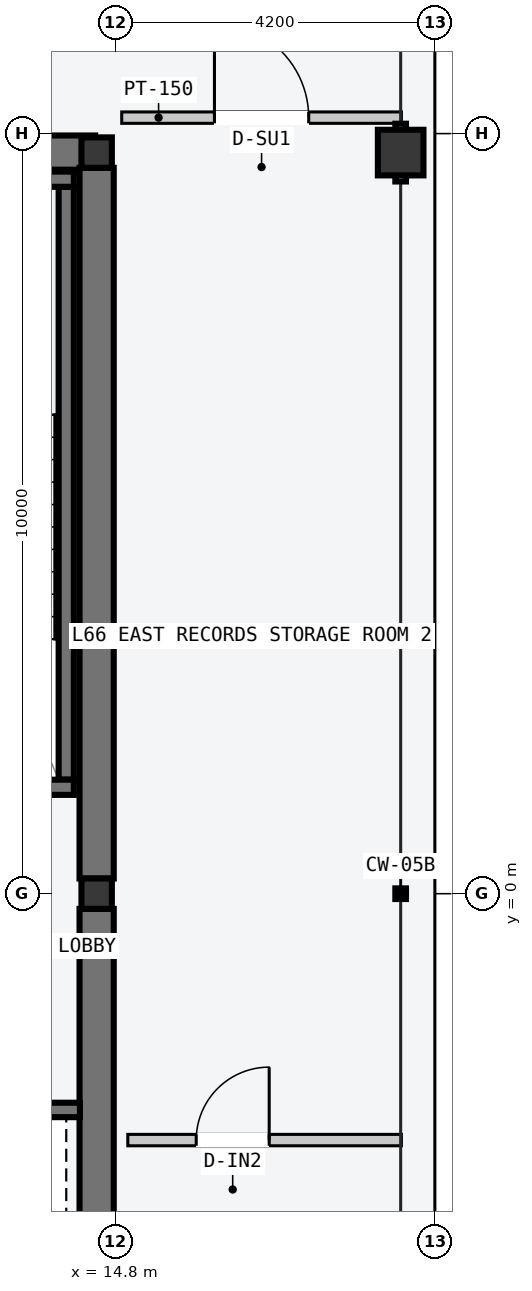
"""IFC4 building model, lengths in metres.
Left out: names, types, materials, properties, quantities, classifications, styles, units other than length and angle.
Written with IfcOpenShell. Run it as: python <this file> out.ifc"""

import sys

from ifc_helpers import new_model, si_unit, direction, frame, frame_2d, origin, origin_2d, place, context, subcontext, project, spatial, rectangle, hollow_rectangle, i_section, extrude, element, fill, save


model = new_model("IFC4")
c1 = context("Model", 3, precision=1e-05, world=origin(), true_north=direction((0.0, 1.0)))
c2 = subcontext(c1, "Body", "Model", "MODEL_VIEW")
j1 = project(units=[si_unit("LENGTHUNIT", "METRE"), si_unit("PLANEANGLEUNIT", "RADIAN")], contexts=[c1])
p1 = place(None, origin())
s1 = spatial("IfcSite", under=j1, at=p1, CompositionType="ELEMENT")
p2 = place(p1, origin())
s2 = spatial("IfcBuilding", under=s1, at=p2, CompositionType="ELEMENT")
p3 = place(p2, frame((0.0, 0.0, 250.8)))
s3 = spatial("IfcBuildingStorey", under=s2, at=p3, CompositionType="ELEMENT", Elevation=250.8)
p4 = place(p3, frame((8.07, 9.75, -0.2), z_axis=(0.0, 0.0, 1.0), x_axis=(1.0, 0.0, 0.0)))
e1 = element("IfcWall", 1, at=p4, inside=s3, PredefinedType="SHEAR", context=c2, shape_type="SweptSolid", body=[
    extrude(rectangle(XDim=6.46, YDim=0.45, at=frame_2d((3.23, 0.0))), origin(), (0.0, 0.0, 1.0), 3.6),
])
for number, where, z_axis, x_axis in (
    (2, (14.55, -9.55, -0.2), (0.0, 0.0, 1.0), (0.0, 1.0, 0.0)),
    (3, (14.55, 0.2, -0.2), (0.0, 0.0, 1.0), (0.0, 1.0, 0.0)),
):
    element("IfcWall", number, at=place(p3, frame(where, z_axis=z_axis, x_axis=x_axis)), inside=s3, PredefinedType="SHEAR", context=c2, shape_type="SweptSolid", body=[
        extrude(rectangle(XDim=9.35, YDim=0.45, at=frame_2d((4.675, 0.0))), origin(), (0.0, 0.0, 1.0), 3.6),
    ])
p5 = place(p3, frame((14.15, 1.5, -0.2), z_axis=(0.0, 0.0, 1.0), x_axis=(0.0, 1.0, 0.0)))
e4 = element("IfcWall", 4, at=p5, inside=s3, PredefinedType="SOLIDWALL", context=c2, shape_type="SweptSolid", body=[
    extrude(rectangle(XDim=7.8, YDim=0.2, at=frame_2d((3.9, 0.0))), origin(), (0.0, 0.0, 1.0), 3.6),
])
p6 = place(p3, frame((10.53, 1.4, -0.2), z_axis=(0.0, 0.0, 1.0), x_axis=(1.0, 0.0, 0.0)))
e5 = element("IfcWall", 5, at=p6, inside=s3, PredefinedType="SOLIDWALL", context=c2, shape_type="SweptSolid", body=[
    extrude(rectangle(XDim=3.72, YDim=0.2, at=frame_2d((1.86, 0.0))), origin(), (0.0, 0.0, 1.0), 3.6),
])
p7 = place(p6, frame((1.5, 0.0, 0.2)))
e6 = element("IfcOpeningElement", 6, at=p7, cuts=e5, PredefinedType="OPENING", context=c2, shape_type="SweptSolid", body=[
    extrude(rectangle(XDim=1.12, YDim=2.18, at=frame_2d((0.56, 1.09))), frame((0.0, 0.11, 0.0), z_axis=(0.0, -1.0, 0.0), x_axis=(1.0, 0.0, 0.0)), (0.0, 0.0, 1.0), 0.22),
])
p8 = place(p3, frame((10.53, 9.4, -0.2), z_axis=(0.0, 0.0, 1.0), x_axis=(1.0, 0.0, 0.0)))
e7 = element("IfcWall", 7, at=p8, inside=s3, PredefinedType="SOLIDWALL", context=c2, shape_type="SweptSolid", body=[
    extrude(rectangle(XDim=3.72, YDim=0.2, at=frame_2d((1.86, 0.0))), origin(), (0.0, 0.0, 1.0), 3.6),
])
for number, where, z_axis, x_axis in (
    (8, (14.55, 0.0, 0.0), (0.0, 0.0, 1.0), (1.0, 0.0, 0.0)),
    (9, (14.55, 9.75, 0.0), (0.0, 0.0, 1.0), (1.0, 0.0, 0.0)),
):
    element("IfcColumn", number, at=place(p3, frame(where, z_axis=z_axis, x_axis=x_axis)), inside=s3, PredefinedType="COLUMN", context=c2, shape_type="SweptSolid", body=[
        extrude(i_section(OverallWidth=0.4, OverallDepth=0.4, WebThickness=0.013, FlangeThickness=0.021, at=origin_2d()), origin(), (0.0, 0.0, 1.0), 3.6),
    ])
p9 = place(p3, frame((18.55, 9.75, 0.0), z_axis=(0.0, 0.0, 1.0), x_axis=(0.0, 1.0, 0.0)))
e10 = element("IfcColumn", 10, at=p9, inside=s3, PredefinedType="COLUMN", context=c2, shape_type="SweptSolid", body=[
    extrude(hollow_rectangle(XDim=0.6, YDim=0.6, WallThickness=0.025, at=origin_2d()), origin(), (0.0, 0.0, 1.0), 3.6),
])
p10 = place(p3, frame((11.65, -2.845, -0.2), z_axis=(0.0, 0.0, 1.0), x_axis=(1.0, 0.0, 0.0)))
e11 = element("IfcWall", 11, at=p10, inside=s3, PredefinedType="SOLIDWALL", context=c2, shape_type="SweptSolid", body=[
    extrude(rectangle(XDim=2.68, YDim=0.19, at=frame_2d((1.34, 0.0))), origin(), (0.0, 0.0, 1.0), 3.6),
])
p11 = place(p10, frame((0.65, 0.0, 0.2)))
e12 = element("IfcOpeningElement", 12, at=p11, cuts=e11, PredefinedType="OPENING", context=c2, shape_type="SweptSolid", body=[
    extrude(rectangle(XDim=1.2, YDim=2.2, at=frame_2d((0.6, 1.1))), frame((0.0, 0.105, 0.0), z_axis=(0.0, -1.0, 0.0), x_axis=(1.0, 0.0, 0.0)), (0.0, 0.0, 1.0), 0.21),
])
p12 = place(p3, frame((14.88, 10.21, 0.0), z_axis=(0.0, 0.0, 1.0), x_axis=(1.0, 0.0, 0.0)))
e13 = element("IfcWall", 13, at=p12, inside=s3, PredefinedType="PARTITIONING", context=c2, shape_type="SweptSolid", body=[
    extrude(rectangle(XDim=3.68, YDim=0.15, at=frame_2d((1.84, 0.0))), origin(), (0.0, 0.0, 1.0), 3.4),
])
p13 = place(p12, frame((1.22, 0.0, 0.0)))
e14 = element("IfcOpeningElement", 14, at=p13, cuts=e13, PredefinedType="OPENING", context=c2, shape_type="SweptSolid", body=[
    extrude(rectangle(XDim=1.24, YDim=2.24, at=frame_2d((0.62, 1.12))), frame((0.0, 0.085, 0.0), z_axis=(0.0, -1.0, 0.0), x_axis=(1.0, 0.0, 0.0)), (0.0, 0.0, 1.0), 0.17),
])
p14 = place(p3, frame((14.96, -3.242, 0.0), z_axis=(0.0, 0.0, 1.0), x_axis=(1.0, 0.0, 0.0)))
e15 = element("IfcWall", 15, at=p14, inside=s3, PredefinedType="PARTITIONING", context=c2, shape_type="SweptSolid", body=[
    extrude(rectangle(XDim=3.6, YDim=0.15, at=frame_2d((1.8, 0.0))), origin(), (0.0, 0.0, 1.0), 3.05),
])
p15 = place(p14, frame((0.9, 0.0, 0.0)))
e16 = element("IfcOpeningElement", 16, at=p15, cuts=e15, PredefinedType="OPENING", context=c2, shape_type="SweptSolid", body=[
    extrude(rectangle(XDim=0.96, YDim=2.18, at=frame_2d((0.48, 1.09))), frame((0.0, 0.085, 0.0), z_axis=(0.0, -1.0, 0.0), x_axis=(1.0, 0.0, 0.0)), (0.0, 0.0, 1.0), 0.17),
])
p16 = place(p13, origin())
e17 = element("IfcDoor", 17, at=p16, inside=s3, OperationType="SINGLE_SWING_LEFT", PredefinedType="DOOR", context=c2, shape_type="SweptSolid", body=[
    extrude(rectangle(XDim=1.24, YDim=2.24, at=frame_2d((0.62, 1.12))), frame((0.0, 0.025, 0.0), z_axis=(0.0, -1.0, 0.0), x_axis=(1.0, 0.0, 0.0)), (0.0, 0.0, 1.0), 0.05),
])
fill(e14, e17)
p17 = place(p15, origin())
e18 = element("IfcDoor", 18, at=p17, inside=s3, OperationType="SINGLE_SWING_RIGHT", PredefinedType="DOOR", context=c2, shape_type="SweptSolid", body=[
    extrude(rectangle(XDim=0.96, YDim=2.18, at=frame_2d((0.48, 1.09))), frame((0.0, 0.025, 0.0), z_axis=(0.0, -1.0, 0.0), x_axis=(1.0, 0.0, 0.0)), (0.0, 0.0, 1.0), 0.05),
])
fill(e16, e18)
save(model, sys.argv[1])
